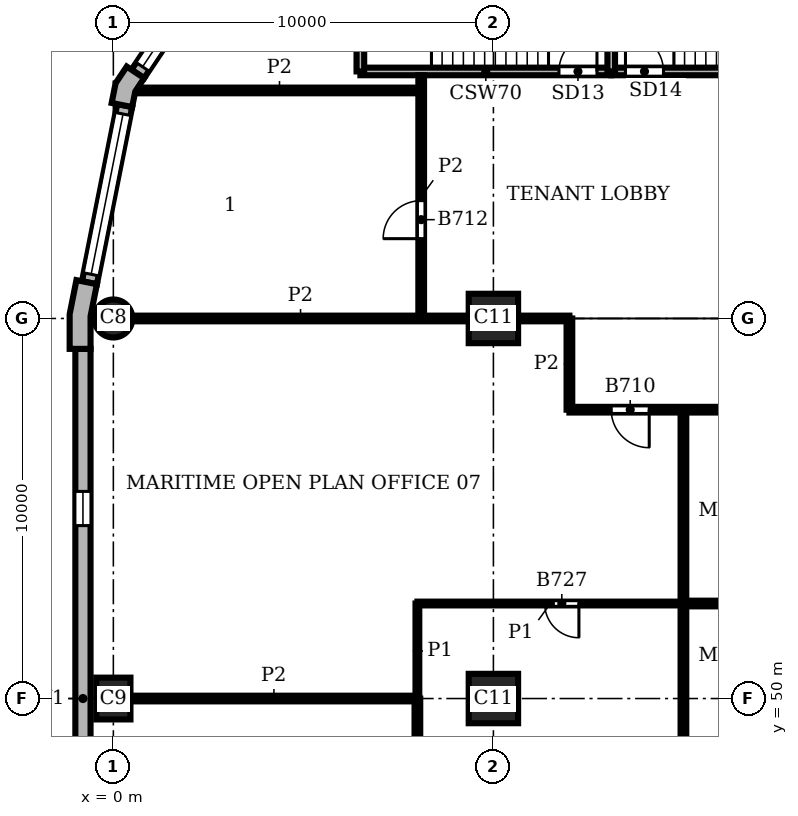
"""IFC4 building model, lengths in metres.
Left out: names, types, materials, properties, quantities, classifications, styles, units other than length and angle.
Written with IfcOpenShell. Run it as: python <this file> out.ifc"""

import sys

from ifc_helpers import new_model, si_unit, direction, frame, frame_2d, origin, origin_2d, place, context, subcontext, project, spatial, polyline, rectangle, circle, outline, extrude, element, fill, save


model = new_model("IFC4")
c1 = context("Model", 3, precision=1e-05, world=origin(), true_north=direction((0.0, 1.0)))
c2 = subcontext(c1, "Body", "Model", "MODEL_VIEW")
j1 = project(units=[si_unit("LENGTHUNIT", "METRE"), si_unit("PLANEANGLEUNIT", "RADIAN")], contexts=[c1])
p1 = place(None, origin())
s1 = spatial("IfcSite", under=j1, at=p1, CompositionType="ELEMENT")
p2 = place(p1, origin())
s2 = spatial("IfcBuilding", under=s1, at=p2, CompositionType="ELEMENT")
p3 = place(p2, frame((0.0, 0.0, 201.9)))
s3 = spatial("IfcBuildingStorey", under=s2, at=p3, CompositionType="ELEMENT", Elevation=201.9)
p4 = place(p3, frame((0.0, 60.0, 0.0), z_axis=(0.0, 0.0, 1.0), x_axis=(1.0, 0.0, 0.0)))
e1 = element("IfcColumn", 1, at=p4, inside=s3, PredefinedType="COLUMN", context=c2, shape_type="SweptSolid", body=[
    extrude(circle(Radius=0.5, at=origin_2d()), origin(), (0.0, 0.0, 1.0), 3.9),
])
p5 = place(p3, frame((0.0, 50.0, 0.0), z_axis=(0.0, 0.0, 1.0), x_axis=(0.0, 1.0, 0.0)))
e2 = element("IfcColumn", 2, at=p5, inside=s3, PredefinedType="COLUMN", context=c2, shape_type="SweptSolid", body=[
    extrude(rectangle(XDim=1.1, YDim=0.9, at=origin_2d()), origin(), (0.0, 0.0, 1.0), 3.9),
])
for number, where, z_axis, x_axis in (
    (3, (10.0, 50.0, 0.0), (0.0, 0.0, 1.0), (1.0, 0.0, 0.0)),
    (4, (10.0, 60.0, 0.0), (0.0, 0.0, 1.0), (1.0, 0.0, 0.0)),
):
    element("IfcColumn", number, at=place(p3, frame(where, z_axis=z_axis, x_axis=x_axis)), inside=s3, PredefinedType="COLUMN", context=c2, shape_type="SweptSolid", body=[
        extrude(rectangle(XDim=1.3, YDim=1.3, at=origin_2d()), origin(), (0.0, 0.0, 1.0), 3.9),
    ])
p6 = place(p3, origin())
e5 = element("IfcWall", 5, at=p6, inside=s3, PredefinedType="SOLIDWALL", context=c2, shape_type="SweptSolid", body=[
    extrude(outline(polyline([(0.477, 66.545), (0.352, 66.629), (0.059, 66.189), (-0.045, 65.67), (0.103, 65.641), (0.495, 65.563), (0.577, 65.974), (0.81, 66.323), (0.477, 66.545)])), origin(), (0.0, 0.0, 1.0), 3.9),
])
e6 = element("IfcWall", 6, at=p6, inside=s3, PredefinedType="SOLIDWALL", context=c2, shape_type="SweptSolid", body=[
    extrude(outline(polyline([(-0.825, 60.98), (-0.972, 61.009), (-1.15, 60.113), (-1.15, 59.2), (-1.0, 59.2), (-0.6, 59.2), (-0.6, 60.059), (-0.432, 60.902), (-0.825, 60.98)])), origin(), (0.0, 0.0, 1.0), 3.9),
])
p7 = place(p3, frame((3.284, 70.386, 0.0), z_axis=(0.0, 0.0, 1.0), x_axis=(-0.555541552266, -0.831488775454, 0.0)))
e7 = element("IfcWall", 7, at=p7, inside=s3, PredefinedType="SOLIDWALL", context=c2, shape_type="SweptSolid", body=[
    extrude(rectangle(XDim=4.753, YDim=0.4, at=frame_2d((2.376, 0.0))), origin(), (0.0, 0.0, 1.0), 3.9),
])
p8 = place(p7, frame((0.226, 0.0, 0.9)))
e8 = element("IfcOpeningElement", 8, at=p8, cuts=e7, PredefinedType="OPENING", context=c2, shape_type="SweptSolid", body=[
    extrude(rectangle(XDim=4.3, YDim=2.35, at=frame_2d((2.15, 1.175))), frame((0.0, 0.21, 0.0), z_axis=(0.0, -1.0, 0.0), x_axis=(1.0, 0.0, 0.0)), (0.0, 0.0, 1.0), 0.42),
])
p9 = place(p3, frame((0.299, 65.602, 0.0), z_axis=(0.0, 0.0, 1.0), x_axis=(-0.195098533057, -0.98078364709, 0.0)))
e9 = element("IfcWall", 9, at=p9, inside=s3, PredefinedType="SOLIDWALL", context=c2, shape_type="SweptSolid", body=[
    extrude(rectangle(XDim=4.753, YDim=0.4, at=frame_2d((2.376, 0.0))), origin(), (0.0, 0.0, 1.0), 3.9),
])
p10 = place(p9, frame((0.226, 0.0, 0.9)))
e10 = element("IfcOpeningElement", 10, at=p10, cuts=e9, PredefinedType="OPENING", context=c2, shape_type="SweptSolid", body=[
    extrude(rectangle(XDim=4.3, YDim=2.35, at=frame_2d((2.15, 1.175))), frame((0.0, 0.21, 0.0), z_axis=(0.0, -1.0, 0.0), x_axis=(1.0, 0.0, 0.0)), (0.0, 0.0, 1.0), 0.42),
])
p11 = place(p3, frame((-0.8, 59.2, 0.0), z_axis=(0.0, 0.0, 1.0), x_axis=(0.0, -1.0, 0.0)))
e11 = element("IfcWall", 11, at=p11, inside=s3, PredefinedType="SOLIDWALL", context=c2, shape_type="SweptSolid", body=[
    extrude(rectangle(XDim=18.4, YDim=0.4, at=frame_2d((9.2, 0.0))), origin(), (0.0, 0.0, 1.0), 3.9),
])
p12 = place(p11, frame((3.75, 0.0, 0.9)))
e12 = element("IfcOpeningElement", 12, at=p12, cuts=e11, PredefinedType="OPENING", context=c2, shape_type="SweptSolid", body=[
    extrude(rectangle(XDim=0.9, YDim=2.35, at=frame_2d((0.45, 1.175))), frame((0.0, 0.21, 0.0), z_axis=(0.0, -1.0, 0.0), x_axis=(1.0, 0.0, 0.0)), (0.0, 0.0, 1.0), 0.42),
])
p13 = place(p11, frame((13.75, 0.0, 0.9)))
e13 = element("IfcOpeningElement", 13, at=p13, cuts=e11, PredefinedType="OPENING", context=c2, shape_type="SweptSolid", body=[
    extrude(rectangle(XDim=0.9, YDim=2.35, at=frame_2d((0.45, 1.175))), frame((0.0, 0.21, 0.0), z_axis=(0.0, -1.0, 0.0), x_axis=(1.0, 0.0, 0.0)), (0.0, 0.0, 1.0), 0.42),
])
p14 = place(p3, frame((6.5, 66.5, 0.0), z_axis=(0.0, 0.0, 1.0), x_axis=(1.0, 0.0, 0.0)))
e14 = element("IfcWall", 14, at=p14, inside=s3, PredefinedType="SHEAR", context=c2, shape_type="SweptSolid", body=[
    extrude(rectangle(XDim=6.6, YDim=0.2, at=frame_2d((3.3, 0.0))), origin(), (0.0, 0.0, 1.0), 3.58),
])
p15 = place(p14, frame((5.225, 0.0, 0.0)))
e15 = element("IfcOpeningElement", 15, at=p15, cuts=e14, PredefinedType="OPENING", context=c2, shape_type="SweptSolid", body=[
    extrude(rectangle(XDim=1.0, YDim=2.1, at=frame_2d((0.5, 1.05))), frame((0.0, 0.11, 0.0), z_axis=(0.0, -1.0, 0.0), x_axis=(1.0, 0.0, 0.0)), (0.0, 0.0, 1.0), 0.22),
])
p16 = place(p3, frame((13.1, 66.5, 0.0), z_axis=(0.0, 0.0, 1.0), x_axis=(1.0, 0.0, 0.0)))
e16 = element("IfcWall", 16, at=p16, inside=s3, PredefinedType="SHEAR", context=c2, shape_type="SweptSolid", body=[
    extrude(rectangle(XDim=6.6, YDim=0.2, at=frame_2d((3.3, 0.0))), origin(), (0.0, 0.0, 1.0), 3.58),
])
p17 = place(p16, frame((0.375, 0.0, 0.0)))
e17 = element("IfcOpeningElement", 17, at=p17, cuts=e16, PredefinedType="OPENING", context=c2, shape_type="SweptSolid", body=[
    extrude(rectangle(XDim=1.0, YDim=2.1, at=frame_2d((0.5, 1.05))), frame((0.0, 0.11, 0.0), z_axis=(0.0, -1.0, 0.0), x_axis=(1.0, 0.0, 0.0)), (0.0, 0.0, 1.0), 0.22),
])
for number, where, z_axis, x_axis in (
    (18, (6.5, 66.5, 0.0), (0.0, 0.0, 1.0), (0.0, 1.0, 0.0)),
    (19, (13.1, 66.5, 0.0), (0.0, 0.0, 1.0), (0.0, 1.0, 0.0)),
):
    element("IfcWall", number, at=place(p3, frame(where, z_axis=z_axis, x_axis=x_axis)), inside=s3, PredefinedType="SHEAR", context=c2, shape_type="SweptSolid", body=[
        extrude(rectangle(XDim=3.3, YDim=0.2, at=frame_2d((1.65, 0.0))), origin(), (0.0, 0.0, 1.0), 3.58),
    ])
p18 = place(p3, frame((8.0, 50.0, 0.0), z_axis=(0.0, 0.0, 1.0), x_axis=(0.0, 1.0, 0.0)))
e20 = element("IfcWall", 20, at=p18, inside=s3, PredefinedType="PARTITIONING", context=c2, shape_type="SweptSolid", body=[
    extrude(rectangle(XDim=2.5, YDim=0.1, at=frame_2d((1.25, 0.0))), origin(), (0.0, 0.0, 1.0), 3.58),
])
p19 = place(p3, frame((8.0, 52.5, 0.0), z_axis=(0.0, 0.0, 1.0), x_axis=(1.0, 0.0, 0.0)))
e21 = element("IfcWall", 21, at=p19, inside=s3, PredefinedType="PARTITIONING", context=c2, shape_type="SweptSolid", body=[
    extrude(rectangle(XDim=7.0, YDim=0.1, at=frame_2d((3.5, 0.0))), origin(), (0.0, 0.0, 1.0), 3.58),
])
p20 = place(p19, frame((3.35, 0.0, 0.0)))
e22 = element("IfcOpeningElement", 22, at=p20, cuts=e21, PredefinedType="OPENING", context=c2, shape_type="SweptSolid", body=[
    extrude(rectangle(XDim=0.9, YDim=2.1, at=frame_2d((0.45, 1.05))), frame((0.0, 0.06, 0.0), z_axis=(0.0, -1.0, 0.0), x_axis=(1.0, 0.0, 0.0)), (0.0, 0.0, 1.0), 0.12),
])
p21 = place(p3, frame((8.0, 40.0, 0.0), z_axis=(0.0, 0.0, 1.0), x_axis=(0.0, 1.0, 0.0)))
e23 = element("IfcWall", 23, at=p21, inside=s3, PredefinedType="PARTITIONING", context=c2, shape_type="SweptSolid", body=[
    extrude(rectangle(XDim=10.0, YDim=0.15, at=frame_2d((5.0, 0.0))), origin(), (0.0, 0.0, 1.0), 3.58),
])
p22 = place(p3, frame((8.1, 60.0, 0.0), z_axis=(0.0, 0.0, 1.0), x_axis=(0.0, 1.0, 0.0)))
e24 = element("IfcWall", 24, at=p22, inside=s3, PredefinedType="PARTITIONING", context=c2, shape_type="SweptSolid", body=[
    extrude(rectangle(XDim=6.4, YDim=0.15, at=frame_2d((3.2, 0.0))), origin(), (0.0, 0.0, 1.0), 3.58),
])
p23 = place(p22, frame((2.1, 0.0, 0.0)))
e25 = element("IfcOpeningElement", 25, at=p23, cuts=e24, PredefinedType="OPENING", context=c2, shape_type="SweptSolid", body=[
    extrude(rectangle(XDim=1.0, YDim=2.1, at=frame_2d((0.5, 1.05))), frame((0.0, 0.085, 0.0), z_axis=(0.0, -1.0, 0.0), x_axis=(1.0, 0.0, 0.0)), (0.0, 0.0, 1.0), 0.17),
])
p24 = place(p3, frame((12.0, 57.6, 0.0), z_axis=(0.0, 0.0, 1.0), x_axis=(0.0, 1.0, 0.0)))
e26 = element("IfcWall", 26, at=p24, inside=s3, PredefinedType="PARTITIONING", context=c2, shape_type="SweptSolid", body=[
    extrude(rectangle(XDim=2.4, YDim=0.15, at=frame_2d((1.2, 0.0))), origin(), (0.0, 0.0, 1.0), 3.58),
])
p25 = place(p3, frame((15.0, 28.0, 0.0), z_axis=(0.0, 0.0, 1.0), x_axis=(0.0, 1.0, 0.0)))
e27 = element("IfcWall", 27, at=p25, inside=s3, PredefinedType="PARTITIONING", context=c2, shape_type="SweptSolid", body=[
    extrude(rectangle(XDim=29.6, YDim=0.15, at=frame_2d((14.8, 0.0))), origin(), (0.0, 0.0, 1.0), 3.58),
])
p26 = place(p3, frame((0.45, 50.0, 0.0), z_axis=(0.0, 0.0, 1.0), x_axis=(1.0, 0.0, 0.0)))
e28 = element("IfcWall", 28, at=p26, inside=s3, PredefinedType="PARTITIONING", context=c2, shape_type="SweptSolid", body=[
    extrude(rectangle(XDim=7.55, YDim=0.15, at=frame_2d((3.775, 0.0))), origin(), (0.0, 0.0, 1.0), 3.58),
])
p27 = place(p3, frame((15.0, 52.5, 0.0), z_axis=(0.0, 0.0, 1.0), x_axis=(1.0, 0.0, 0.0)))
e29 = element("IfcWall", 29, at=p27, inside=s3, PredefinedType="PARTITIONING", context=c2, shape_type="SweptSolid", body=[
    extrude(rectangle(XDim=11.0, YDim=0.15, at=frame_2d((5.5, 0.0))), origin(), (0.0, 0.0, 1.0), 3.58),
])
p28 = place(p3, frame((12.0, 57.6, 0.0), z_axis=(0.0, 0.0, 1.0), x_axis=(1.0, 0.0, 0.0)))
e30 = element("IfcWall", 30, at=p28, inside=s3, PredefinedType="PARTITIONING", context=c2, shape_type="SweptSolid", body=[
    extrude(rectangle(XDim=14.0, YDim=0.15, at=frame_2d((7.0, 0.0))), origin(), (0.0, 0.0, 1.0), 3.58),
])
p29 = place(p28, frame((8.85, 0.0, 0.0)))
e31 = element("IfcOpeningElement", 31, at=p29, cuts=e30, PredefinedType="OPENING", context=c2, shape_type="SweptSolid", body=[
    extrude(rectangle(XDim=1.0, YDim=2.1, at=frame_2d((0.5, 1.05))), frame((0.0, 0.085, 0.0), z_axis=(0.0, -1.0, 0.0), x_axis=(1.0, 0.0, 0.0)), (0.0, 0.0, 1.0), 0.17),
])
p30 = place(p28, frame((1.1, 0.0, 0.0)))
e32 = element("IfcOpeningElement", 32, at=p30, cuts=e30, PredefinedType="OPENING", context=c2, shape_type="SweptSolid", body=[
    extrude(rectangle(XDim=1.0, YDim=2.1, at=frame_2d((0.5, 1.05))), frame((0.0, 0.085, 0.0), z_axis=(0.0, -1.0, 0.0), x_axis=(1.0, 0.0, 0.0)), (0.0, 0.0, 1.0), 0.17),
])
p31 = place(p3, frame((0.5, 60.0, 0.0), z_axis=(0.0, 0.0, 1.0), x_axis=(1.0, 0.0, 0.0)))
e33 = element("IfcWall", 33, at=p31, inside=s3, PredefinedType="PARTITIONING", context=c2, shape_type="SweptSolid", body=[
    extrude(rectangle(XDim=8.85, YDim=0.15, at=frame_2d((4.425, 0.0))), origin(), (0.0, 0.0, 1.0), 3.58),
])
p32 = place(p3, frame((10.65, 60.0, 0.0), z_axis=(0.0, 0.0, 1.0), x_axis=(1.0, 0.0, 0.0)))
e34 = element("IfcWall", 34, at=p32, inside=s3, PredefinedType="PARTITIONING", context=c2, shape_type="SweptSolid", body=[
    extrude(rectangle(XDim=1.35, YDim=0.15, at=frame_2d((0.675, 0.0))), origin(), (0.0, 0.0, 1.0), 3.58),
])
p33 = place(p3, frame((0.644, 66.0, 0.0), z_axis=(0.0, 0.0, 1.0), x_axis=(1.0, 0.0, 0.0)))
e35 = element("IfcWall", 35, at=p33, inside=s3, PredefinedType="PARTITIONING", context=c2, shape_type="SweptSolid", body=[
    extrude(rectangle(XDim=7.456, YDim=0.15, at=frame_2d((3.728, 0.0))), origin(), (0.0, 0.0, 1.0), 3.58),
])
p34 = place(p8, origin())
e36 = element("IfcWindow", 36, at=p34, inside=s3, PartitioningType="SINGLE_PANEL", PredefinedType="WINDOW", context=c2, shape_type="SweptSolid", body=[
    extrude(rectangle(XDim=4.3, YDim=2.35, at=frame_2d((2.15, 1.175))), frame((0.0, 0.16, 0.0), z_axis=(0.0, -1.0, 0.0), x_axis=(1.0, 0.0, 0.0)), (0.0, 0.0, 1.0), 0.06),
])
fill(e8, e36)
p35 = place(p10, origin())
e37 = element("IfcWindow", 37, at=p35, inside=s3, PartitioningType="SINGLE_PANEL", PredefinedType="WINDOW", context=c2, shape_type="SweptSolid", body=[
    extrude(rectangle(XDim=4.3, YDim=2.35, at=frame_2d((2.15, 1.175))), frame((0.0, 0.16, 0.0), z_axis=(0.0, -1.0, 0.0), x_axis=(1.0, 0.0, 0.0)), (0.0, 0.0, 1.0), 0.06),
])
fill(e10, e37)
p36 = place(p12, origin())
e38 = element("IfcWindow", 38, at=p36, inside=s3, PartitioningType="SINGLE_PANEL", PredefinedType="WINDOW", context=c2, shape_type="SweptSolid", body=[
    extrude(rectangle(XDim=0.9, YDim=2.35, at=frame_2d((0.45, 1.175))), frame((0.0, 0.16, 0.0), z_axis=(0.0, -1.0, 0.0), x_axis=(1.0, 0.0, 0.0)), (0.0, 0.0, 1.0), 0.06),
])
fill(e12, e38)
p37 = place(p15, origin())
e39 = element("IfcDoor", 39, at=p37, inside=s3, OperationType="SINGLE_SWING_RIGHT", PredefinedType="DOOR", context=c2, shape_type="SweptSolid", body=[
    extrude(rectangle(XDim=1.0, YDim=2.1, at=frame_2d((0.5, 1.05))), frame((0.0, 0.025, 0.0), z_axis=(0.0, -1.0, 0.0), x_axis=(1.0, 0.0, 0.0)), (0.0, 0.0, 1.0), 0.05),
])
fill(e15, e39)
p38 = place(p17, origin())
e40 = element("IfcDoor", 40, at=p38, inside=s3, OperationType="SINGLE_SWING_LEFT", PredefinedType="DOOR", context=c2, shape_type="SweptSolid", body=[
    extrude(rectangle(XDim=1.0, YDim=2.1, at=frame_2d((0.5, 1.05))), frame((0.0, 0.025, 0.0), z_axis=(0.0, -1.0, 0.0), x_axis=(1.0, 0.0, 0.0)), (0.0, 0.0, 1.0), 0.05),
])
fill(e17, e40)
p39 = place(p30, frame((1.0, 0.0, 0.0), z_axis=(0.0, 0.0, 1.0), x_axis=(-1.0, 0.0, 0.0)))
e41 = element("IfcDoor", 41, at=p39, inside=s3, OperationType="SINGLE_SWING_LEFT", PredefinedType="DOOR", context=c2, shape_type="SweptSolid", body=[
    extrude(rectangle(XDim=1.0, YDim=2.1, at=frame_2d((0.5, 1.05))), frame((0.0, 0.025, 0.0), z_axis=(0.0, -1.0, 0.0), x_axis=(1.0, 0.0, 0.0)), (0.0, 0.0, 1.0), 0.05),
])
fill(e32, e41)
p40 = place(p23, origin())
e42 = element("IfcDoor", 42, at=p40, inside=s3, OperationType="SINGLE_SWING_LEFT", PredefinedType="DOOR", context=c2, shape_type="SweptSolid", body=[
    extrude(rectangle(XDim=1.0, YDim=2.1, at=frame_2d((0.5, 1.05))), frame((0.0, 0.025, 0.0), z_axis=(0.0, -1.0, 0.0), x_axis=(1.0, 0.0, 0.0)), (0.0, 0.0, 1.0), 0.05),
])
fill(e25, e42)
p41 = place(p20, frame((0.9, 0.0, 0.0), z_axis=(0.0, 0.0, 1.0), x_axis=(-1.0, 0.0, 0.0)))
e43 = element("IfcDoor", 43, at=p41, inside=s3, OperationType="SINGLE_SWING_LEFT", PredefinedType="DOOR", context=c2, shape_type="SweptSolid", body=[
    extrude(rectangle(XDim=0.9, YDim=2.1, at=frame_2d((0.45, 1.05))), frame((0.0, 0.025, 0.0), z_axis=(0.0, -1.0, 0.0), x_axis=(1.0, 0.0, 0.0)), (0.0, 0.0, 1.0), 0.05),
])
fill(e22, e43)
save(model, sys.argv[1])
